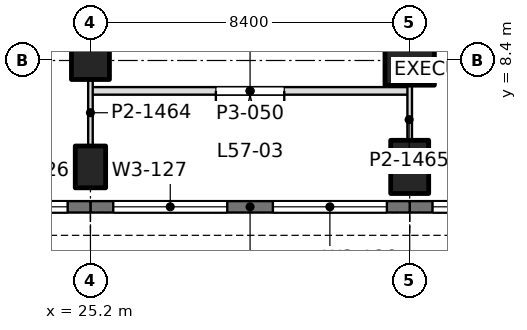
"""IFC4 building model, lengths in metres.
Left out: names, types, materials, properties, quantities, classifications, styles, units other than length and angle.
Written with IfcOpenShell. Run it as: python <this file> out.ifc"""

import sys

from ifc_helpers import new_model, si_unit, direction, frame, frame_2d, origin, origin_2d, place, context, subcontext, project, spatial, rectangle, extrude, element, fill, save


model = new_model("IFC4")
c1 = context("Model", 3, precision=1e-05, world=origin(), true_north=direction((0.0, 1.0)))
c2 = subcontext(c1, "Body", "Model", "MODEL_VIEW")
j1 = project(units=[si_unit("LENGTHUNIT", "METRE"), si_unit("PLANEANGLEUNIT", "RADIAN")], contexts=[c1])
p1 = place(None, origin())
s1 = spatial("IfcSite", under=j1, at=p1, CompositionType="ELEMENT")
p2 = place(p1, origin())
s2 = spatial("IfcBuilding", under=s1, at=p2, CompositionType="ELEMENT")
p3 = place(p2, frame((0.0, 0.0, 250.2)))
s3 = spatial("IfcBuildingStorey", under=s2, at=p3, CompositionType="ELEMENT", Elevation=250.2)
p4 = place(p3, frame((25.2, 5.6, 0.0), z_axis=(0.0, 0.0, 1.0), x_axis=(1.0, 0.0, 0.0)))
e1 = element("IfcColumn", 1, at=p4, inside=s3, PredefinedType="COLUMN", context=c2, shape_type="SweptSolid", body=[
    extrude(rectangle(XDim=0.8, YDim=1.1, at=origin_2d()), origin(), (0.0, 0.0, 1.0), 4.5),
])
p5 = place(p3, frame((25.2, 8.4, 0.0), z_axis=(0.0, 0.0, 1.0), x_axis=(1.0, 0.0, 0.0)))
e2 = element("IfcColumn", 2, at=p5, inside=s3, PredefinedType="COLUMN", context=c2, shape_type="SweptSolid", body=[
    extrude(rectangle(XDim=1.0, YDim=1.0, at=origin_2d()), origin(), (0.0, 0.0, 1.0), 4.5),
])
p6 = place(p3, frame((33.6, 5.6, 0.0), z_axis=(0.0, 0.0, 1.0), x_axis=(1.0, 0.0, 0.0)))
e3 = element("IfcColumn", 3, at=p6, inside=s3, PredefinedType="COLUMN", context=c2, shape_type="SweptSolid", body=[
    extrude(rectangle(XDim=1.0, YDim=1.4, at=origin_2d()), origin(), (0.0, 0.0, 1.0), 4.5),
])
p7 = place(p3, frame((33.6, 8.4, 0.0), z_axis=(0.0, 0.0, 1.0), x_axis=(1.0, 0.0, 0.0)))
e4 = element("IfcColumn", 4, at=p7, inside=s3, PredefinedType="COLUMN", context=c2, shape_type="SweptSolid", body=[
    extrude(rectangle(XDim=1.3, YDim=1.3, at=origin_2d()), origin(), (0.0, 0.0, 1.0), 4.5),
])
p8 = place(p3, frame((42.0, 4.55, 0.0), z_axis=(0.0, 0.0, 1.0), x_axis=(-1.0, 0.0, 0.0)))
e5 = element("IfcWall", 5, at=p8, inside=s3, PredefinedType="SOLIDWALL", context=c2, shape_type="SweptSolid", body=[
    extrude(rectangle(XDim=8.4, YDim=0.3, at=frame_2d((4.2, 0.0))), origin(), (0.0, 0.0, 1.0), 4.35),
])
p9 = place(p8, frame((0.6, 0.0, 0.9)))
e6 = element("IfcOpeningElement", 6, at=p9, cuts=e5, PredefinedType="OPENING", context=c2, shape_type="SweptSolid", body=[
    extrude(rectangle(XDim=3.0, YDim=2.4, at=frame_2d((1.5, 1.2))), frame((0.0, 0.16, 0.0), z_axis=(0.0, -1.0, 0.0), x_axis=(1.0, 0.0, 0.0)), (0.0, 0.0, 1.0), 0.32),
])
p10 = place(p8, frame((4.8, 0.0, 0.9)))
e7 = element("IfcOpeningElement", 7, at=p10, cuts=e5, PredefinedType="OPENING", context=c2, shape_type="SweptSolid", body=[
    extrude(rectangle(XDim=3.0, YDim=2.4, at=frame_2d((1.5, 1.2))), frame((0.0, 0.16, 0.0), z_axis=(0.0, -1.0, 0.0), x_axis=(1.0, 0.0, 0.0)), (0.0, 0.0, 1.0), 0.32),
])
p11 = place(p3, frame((33.6, 4.55, 0.0), z_axis=(0.0, 0.0, 1.0), x_axis=(-1.0, 0.0, 0.0)))
e8 = element("IfcWall", 8, at=p11, inside=s3, PredefinedType="SOLIDWALL", context=c2, shape_type="SweptSolid", body=[
    extrude(rectangle(XDim=8.4, YDim=0.3, at=frame_2d((4.2, 0.0))), origin(), (0.0, 0.0, 1.0), 4.35),
])
p12 = place(p11, frame((0.6, 0.0, 0.9)))
e9 = element("IfcOpeningElement", 9, at=p12, cuts=e8, PredefinedType="OPENING", context=c2, shape_type="SweptSolid", body=[
    extrude(rectangle(XDim=3.0, YDim=2.4, at=frame_2d((1.5, 1.2))), frame((0.0, 0.16, 0.0), z_axis=(0.0, -1.0, 0.0), x_axis=(1.0, 0.0, 0.0)), (0.0, 0.0, 1.0), 0.32),
])
p13 = place(p11, frame((4.8, 0.0, 0.9)))
e10 = element("IfcOpeningElement", 10, at=p13, cuts=e8, PredefinedType="OPENING", context=c2, shape_type="SweptSolid", body=[
    extrude(rectangle(XDim=3.0, YDim=2.4, at=frame_2d((1.5, 1.2))), frame((0.0, 0.16, 0.0), z_axis=(0.0, -1.0, 0.0), x_axis=(1.0, 0.0, 0.0)), (0.0, 0.0, 1.0), 0.32),
])
p14 = place(p3, frame((25.2, 4.55, 0.0), z_axis=(0.0, 0.0, 1.0), x_axis=(-1.0, 0.0, 0.0)))
e11 = element("IfcWall", 11, at=p14, inside=s3, PredefinedType="SOLIDWALL", context=c2, shape_type="SweptSolid", body=[
    extrude(rectangle(XDim=8.4, YDim=0.3, at=frame_2d((4.2, 0.0))), origin(), (0.0, 0.0, 1.0), 4.35),
])
p15 = place(p14, frame((0.6, 0.0, 0.9)))
e12 = element("IfcOpeningElement", 12, at=p15, cuts=e11, PredefinedType="OPENING", context=c2, shape_type="SweptSolid", body=[
    extrude(rectangle(XDim=3.0, YDim=2.4, at=frame_2d((1.5, 1.2))), frame((0.0, 0.16, 0.0), z_axis=(0.0, -1.0, 0.0), x_axis=(1.0, 0.0, 0.0)), (0.0, 0.0, 1.0), 0.32),
])
p16 = place(p14, frame((4.8, 0.0, 0.9)))
e13 = element("IfcOpeningElement", 13, at=p16, cuts=e11, PredefinedType="OPENING", context=c2, shape_type="SweptSolid", body=[
    extrude(rectangle(XDim=3.0, YDim=2.4, at=frame_2d((1.5, 1.2))), frame((0.0, 0.16, 0.0), z_axis=(0.0, -1.0, 0.0), x_axis=(1.0, 0.0, 0.0)), (0.0, 0.0, 1.0), 0.32),
])
p17 = place(p3, frame((25.2, 7.6, 0.0), z_axis=(0.0, 0.0, 1.0), x_axis=(1.0, 0.0, 0.0)))
e14 = element("IfcWall", 14, at=p17, inside=s3, PredefinedType="PARTITIONING", context=c2, shape_type="SweptSolid", body=[
    extrude(rectangle(XDim=8.4, YDim=0.2, at=frame_2d((4.2, 0.0))), origin(), (0.0, 0.0, 1.0), 3.99),
])
p18 = place(p17, frame((3.3, 0.0, 0.0)))
e15 = element("IfcOpeningElement", 15, at=p18, cuts=e14, PredefinedType="OPENING", context=c2, shape_type="SweptSolid", body=[
    extrude(rectangle(XDim=1.8, YDim=2.2, at=frame_2d((0.9, 1.1))), frame((0.0, 0.11, 0.0), z_axis=(0.0, -1.0, 0.0), x_axis=(1.0, 0.0, 0.0)), (0.0, 0.0, 1.0), 0.22),
])
p19 = place(p3, frame((25.2, 6.149, 0.0), z_axis=(0.0, 0.0, 1.0), x_axis=(0.0, 1.0, 0.0)))
e16 = element("IfcWall", 16, at=p19, inside=s3, PredefinedType="PARTITIONING", context=c2, shape_type="SweptSolid", body=[
    extrude(rectangle(XDim=1.753, YDim=0.12, at=frame_2d((0.876, 0.0))), origin(), (0.0, 0.0, 1.0), 3.99),
])
p20 = place(p3, frame((33.6, 6.299, 0.0), z_axis=(0.0, 0.0, 1.0), x_axis=(0.0, 1.0, 0.0)))
e17 = element("IfcWall", 17, at=p20, inside=s3, PredefinedType="PARTITIONING", context=c2, shape_type="SweptSolid", body=[
    extrude(rectangle(XDim=1.453, YDim=0.12, at=frame_2d((0.727, 0.0))), origin(), (0.0, 0.0, 1.0), 3.99),
])
p21 = place(p10, origin())
e18 = element("IfcWindow", 18, at=p21, inside=s3, PartitioningType="SINGLE_PANEL", PredefinedType="WINDOW", context=c2, shape_type="SweptSolid", body=[
    extrude(rectangle(XDim=3.0, YDim=2.4, at=frame_2d((1.5, 1.2))), frame((0.0, 0.03, 0.0), z_axis=(0.0, -1.0, 0.0), x_axis=(1.0, 0.0, 0.0)), (0.0, 0.0, 1.0), 0.06),
])
fill(e7, e18)
p22 = place(p12, origin())
e19 = element("IfcWindow", 19, at=p22, inside=s3, PartitioningType="SINGLE_PANEL", PredefinedType="WINDOW", context=c2, shape_type="SweptSolid", body=[
    extrude(rectangle(XDim=3.0, YDim=2.4, at=frame_2d((1.5, 1.2))), frame((0.0, 0.03, 0.0), z_axis=(0.0, -1.0, 0.0), x_axis=(1.0, 0.0, 0.0)), (0.0, 0.0, 1.0), 0.06),
])
fill(e9, e19)
p23 = place(p13, origin())
e20 = element("IfcWindow", 20, at=p23, inside=s3, PartitioningType="SINGLE_PANEL", PredefinedType="WINDOW", context=c2, shape_type="SweptSolid", body=[
    extrude(rectangle(XDim=3.0, YDim=2.4, at=frame_2d((1.5, 1.2))), frame((0.0, 0.03, 0.0), z_axis=(0.0, -1.0, 0.0), x_axis=(1.0, 0.0, 0.0)), (0.0, 0.0, 1.0), 0.06),
])
fill(e10, e20)
p24 = place(p15, origin())
e21 = element("IfcWindow", 21, at=p24, inside=s3, PartitioningType="SINGLE_PANEL", PredefinedType="WINDOW", context=c2, shape_type="SweptSolid", body=[
    extrude(rectangle(XDim=3.0, YDim=2.4, at=frame_2d((1.5, 1.2))), frame((0.0, 0.03, 0.0), z_axis=(0.0, -1.0, 0.0), x_axis=(1.0, 0.0, 0.0)), (0.0, 0.0, 1.0), 0.06),
])
fill(e12, e21)
p25 = place(p18, frame((1.8, 0.0, 0.0), z_axis=(0.0, 0.0, 1.0), x_axis=(-1.0, 0.0, 0.0)))
e22 = element("IfcDoor", 22, at=p25, inside=s3, OperationType="DOUBLE_DOOR_SINGLE_SWING", PredefinedType="DOOR", context=c2, shape_type="SweptSolid", body=[
    extrude(rectangle(XDim=1.8, YDim=2.2, at=frame_2d((0.9, 1.1))), frame((0.0, 0.025, 0.0), z_axis=(0.0, -1.0, 0.0), x_axis=(1.0, 0.0, 0.0)), (0.0, 0.0, 1.0), 0.05),
])
fill(e15, e22)
save(model, sys.argv[1])
